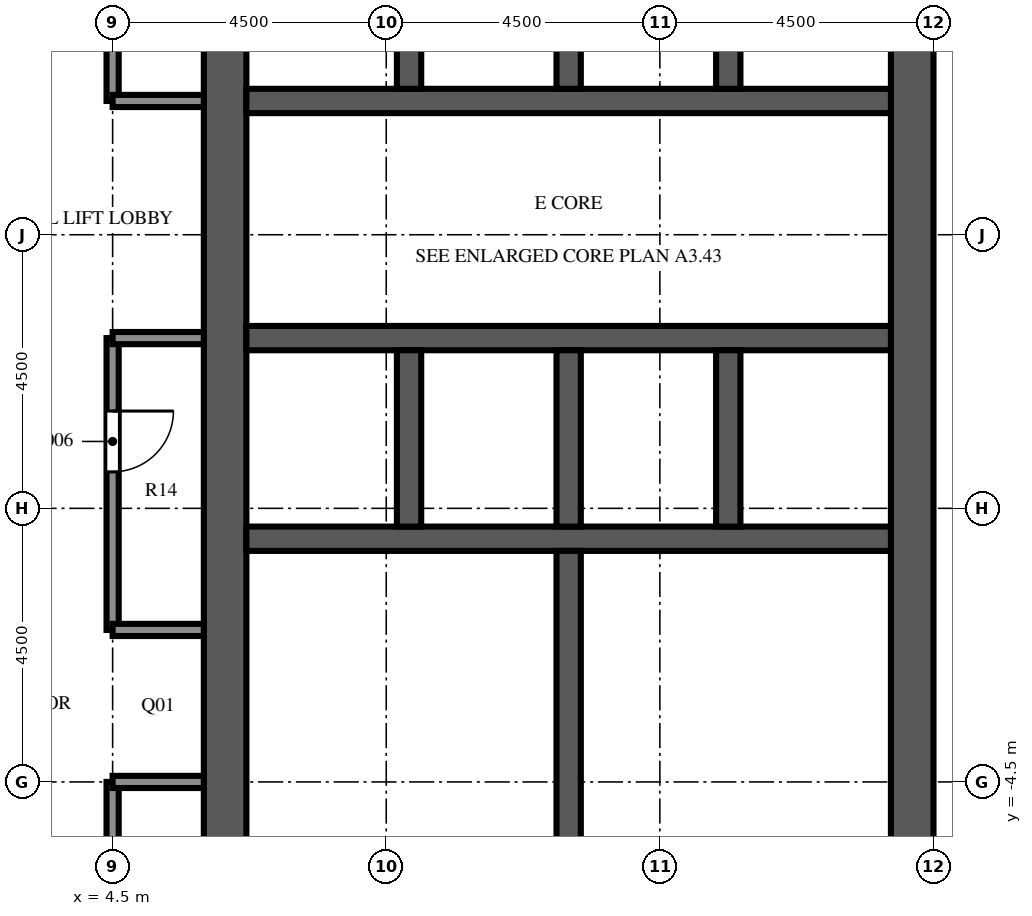
"""IFC4 building model, lengths in metres.
Left out: names, types, materials, properties, quantities, classifications, styles, units other than length and angle.
Written with IfcOpenShell. Run it as: python <this file> out.ifc"""

import sys

from ifc_helpers import new_model, si_unit, direction, frame, frame_2d, origin, place, context, subcontext, project, spatial, rectangle, extrude, element, fill, save


model = new_model("IFC4")
c1 = context("Model", 3, precision=1e-05, world=origin(), true_north=direction((0.0, 1.0)))
c2 = subcontext(c1, "Body", "Model", "MODEL_VIEW")
j1 = project(units=[si_unit("LENGTHUNIT", "METRE"), si_unit("PLANEANGLEUNIT", "RADIAN")], contexts=[c1])
p1 = place(None, origin())
s1 = spatial("IfcSite", under=j1, at=p1, CompositionType="ELEMENT")
p2 = place(p1, origin())
s2 = spatial("IfcBuilding", under=s1, at=p2, CompositionType="ELEMENT")
p3 = place(p2, frame((0.0, 0.0, 295.0)))
s3 = spatial("IfcBuildingStorey", under=s2, at=p3, CompositionType="ELEMENT", Elevation=295.0)
p4 = place(p3, frame((6.35, -9.0, 0.0), z_axis=(0.0, 0.0, 1.0), x_axis=(0.0, 1.0, 0.0)))
e1 = element("IfcWall", 1, at=p4, inside=s3, PredefinedType="SHEAR", context=c2, shape_type="SweptSolid", body=[
    extrude(rectangle(XDim=27.5, YDim=0.7, at=frame_2d((13.75, 0.0))), origin(), (0.0, 0.0, 1.0), 6.0),
])
p5 = place(p4, frame((12.55, 0.0, 0.0)))
e2 = element("IfcOpeningElement", 2, at=p5, cuts=e1, PredefinedType="OPENING", context=c2, shape_type="SweptSolid", body=[
    extrude(rectangle(XDim=2.4, YDim=2.4, at=frame_2d((1.2, 1.2))), frame((0.0, 0.36, 0.0), z_axis=(0.0, -1.0, 0.0), x_axis=(1.0, 0.0, 0.0)), (0.0, 0.0, 1.0), 0.72),
])
p6 = place(p4, frame((5.46, 0.0, 0.0)))
e3 = element("IfcOpeningElement", 3, at=p6, cuts=e1, PredefinedType="OPENING", context=c2, shape_type="SweptSolid", body=[
    extrude(rectangle(XDim=0.968, YDim=2.1, at=frame_2d((0.484, 1.05))), frame((0.0, 0.36, 0.0), z_axis=(0.0, -1.0, 0.0), x_axis=(1.0, 0.0, 0.0)), (0.0, 0.0, 1.0), 0.72),
])
p7 = place(p4, frame((23.54, 0.0, 0.0)))
e4 = element("IfcOpeningElement", 4, at=p7, cuts=e1, PredefinedType="OPENING", context=c2, shape_type="SweptSolid", body=[
    extrude(rectangle(XDim=1.2, YDim=2.1, at=frame_2d((0.6, 1.05))), frame((0.0, 0.36, 0.0), z_axis=(0.0, -1.0, 0.0), x_axis=(1.0, 0.0, 0.0)), (0.0, 0.0, 1.0), 0.72),
])
p8 = place(p3, frame((17.65, -9.0, 0.0), z_axis=(0.0, 0.0, 1.0), x_axis=(0.0, 1.0, 0.0)))
e5 = element("IfcWall", 5, at=p8, inside=s3, PredefinedType="SHEAR", context=c2, shape_type="SweptSolid", body=[
    extrude(rectangle(XDim=27.5, YDim=0.7, at=frame_2d((13.75, 0.0))), origin(), (0.0, 0.0, 1.0), 6.0),
])
p9 = place(p8, frame((12.55, 0.0, 0.0)))
e6 = element("IfcOpeningElement", 6, at=p9, cuts=e5, PredefinedType="OPENING", context=c2, shape_type="SweptSolid", body=[
    extrude(rectangle(XDim=2.4, YDim=2.4, at=frame_2d((1.2, 1.2))), frame((0.0, 0.36, 0.0), z_axis=(0.0, -1.0, 0.0), x_axis=(1.0, 0.0, 0.0)), (0.0, 0.0, 1.0), 0.72),
])
p10 = place(p8, frame((6.825, 0.0, 0.0)))
e7 = element("IfcOpeningElement", 7, at=p10, cuts=e5, PredefinedType="OPENING", context=c2, shape_type="SweptSolid", body=[
    extrude(rectangle(XDim=1.2, YDim=2.1, at=frame_2d((0.6, 1.05))), frame((0.0, 0.36, 0.0), z_axis=(0.0, -1.0, 0.0), x_axis=(1.0, 0.0, 0.0)), (0.0, 0.0, 1.0), 0.72),
])
p11 = place(p8, frame((19.475, 0.0, 0.0)))
e8 = element("IfcOpeningElement", 8, at=p11, cuts=e5, PredefinedType="OPENING", context=c2, shape_type="SweptSolid", body=[
    extrude(rectangle(XDim=1.2, YDim=2.1, at=frame_2d((0.6, 1.05))), frame((0.0, 0.36, 0.0), z_axis=(0.0, -1.0, 0.0), x_axis=(1.0, 0.0, 0.0)), (0.0, 0.0, 1.0), 0.72),
])
p12 = place(p3, frame((6.7, -0.5, 0.0), z_axis=(0.0, 0.0, 1.0), x_axis=(1.0, 0.0, 0.0)))
e9 = element("IfcWall", 9, at=p12, inside=s3, PredefinedType="SHEAR", context=c2, shape_type="SweptSolid", body=[
    extrude(rectangle(XDim=10.6, YDim=0.4, at=frame_2d((5.3, 0.0))), origin(), (0.0, 0.0, 1.0), 6.0),
])
p13 = place(p3, frame((6.7, 2.8, 0.0), z_axis=(0.0, 0.0, 1.0), x_axis=(1.0, 0.0, 0.0)))
e10 = element("IfcWall", 10, at=p13, inside=s3, PredefinedType="SHEAR", context=c2, shape_type="SweptSolid", body=[
    extrude(rectangle(XDim=10.6, YDim=0.4, at=frame_2d((5.3, 0.0))), origin(), (0.0, 0.0, 1.0), 6.0),
])
p14 = place(p13, frame((0.688, 0.0, 0.0)))
e11 = element("IfcOpeningElement", 11, at=p14, cuts=e10, PredefinedType="OPENING", context=c2, shape_type="SweptSolid", body=[
    extrude(rectangle(XDim=1.1, YDim=2.1, at=frame_2d((0.55, 1.05))), frame((0.0, 0.21, 0.0), z_axis=(0.0, -1.0, 0.0), x_axis=(1.0, 0.0, 0.0)), (0.0, 0.0, 1.0), 0.42),
])
p15 = place(p13, frame((3.438, 0.0, 0.0)))
e12 = element("IfcOpeningElement", 12, at=p15, cuts=e10, PredefinedType="OPENING", context=c2, shape_type="SweptSolid", body=[
    extrude(rectangle(XDim=1.1, YDim=2.1, at=frame_2d((0.55, 1.05))), frame((0.0, 0.21, 0.0), z_axis=(0.0, -1.0, 0.0), x_axis=(1.0, 0.0, 0.0)), (0.0, 0.0, 1.0), 0.42),
])
p16 = place(p13, frame((6.113, 0.0, 0.0)))
e13 = element("IfcOpeningElement", 13, at=p16, cuts=e10, PredefinedType="OPENING", context=c2, shape_type="SweptSolid", body=[
    extrude(rectangle(XDim=1.0, YDim=2.1, at=frame_2d((0.5, 1.05))), frame((0.0, 0.21, 0.0), z_axis=(0.0, -1.0, 0.0), x_axis=(1.0, 0.0, 0.0)), (0.0, 0.0, 1.0), 0.42),
])
p17 = place(p13, frame((8.863, 0.0, 0.0)))
e14 = element("IfcOpeningElement", 14, at=p17, cuts=e10, PredefinedType="OPENING", context=c2, shape_type="SweptSolid", body=[
    extrude(rectangle(XDim=1.0, YDim=2.1, at=frame_2d((0.5, 1.05))), frame((0.0, 0.21, 0.0), z_axis=(0.0, -1.0, 0.0), x_axis=(1.0, 0.0, 0.0)), (0.0, 0.0, 1.0), 0.42),
])
p18 = place(p3, frame((6.7, 6.7, 0.0), z_axis=(0.0, 0.0, 1.0), x_axis=(1.0, 0.0, 0.0)))
e15 = element("IfcWall", 15, at=p18, inside=s3, PredefinedType="SHEAR", context=c2, shape_type="SweptSolid", body=[
    extrude(rectangle(XDim=10.6, YDim=0.4, at=frame_2d((5.3, 0.0))), origin(), (0.0, 0.0, 1.0), 6.0),
])
p19 = place(p18, frame((3.438, 0.0, 0.0)))
e16 = element("IfcOpeningElement", 16, at=p19, cuts=e15, PredefinedType="OPENING", context=c2, shape_type="SweptSolid", body=[
    extrude(rectangle(XDim=1.1, YDim=2.1, at=frame_2d((0.55, 1.05))), frame((0.0, 0.21, 0.0), z_axis=(0.0, -1.0, 0.0), x_axis=(1.0, 0.0, 0.0)), (0.0, 0.0, 1.0), 0.42),
])
p20 = place(p18, frame((6.062, 0.0, 0.0)))
e17 = element("IfcOpeningElement", 17, at=p20, cuts=e15, PredefinedType="OPENING", context=c2, shape_type="SweptSolid", body=[
    extrude(rectangle(XDim=1.1, YDim=2.1, at=frame_2d((0.55, 1.05))), frame((0.0, 0.21, 0.0), z_axis=(0.0, -1.0, 0.0), x_axis=(1.0, 0.0, 0.0)), (0.0, 0.0, 1.0), 0.42),
])
p21 = place(p18, frame((8.812, 0.0, 0.0)))
e18 = element("IfcOpeningElement", 18, at=p21, cuts=e15, PredefinedType="OPENING", context=c2, shape_type="SweptSolid", body=[
    extrude(rectangle(XDim=1.1, YDim=2.1, at=frame_2d((0.55, 1.05))), frame((0.0, 0.21, 0.0), z_axis=(0.0, -1.0, 0.0), x_axis=(1.0, 0.0, 0.0)), (0.0, 0.0, 1.0), 0.42),
])
p22 = place(p18, frame((0.738, 0.0, 0.0)))
e19 = element("IfcOpeningElement", 19, at=p22, cuts=e15, PredefinedType="OPENING", context=c2, shape_type="SweptSolid", body=[
    extrude(rectangle(XDim=1.0, YDim=2.1, at=frame_2d((0.5, 1.05))), frame((0.0, 0.21, 0.0), z_axis=(0.0, -1.0, 0.0), x_axis=(1.0, 0.0, 0.0)), (0.0, 0.0, 1.0), 0.42),
])
for number, where, z_axis, x_axis in (
    (20, (9.375, -0.3, 0.0), (0.0, 0.0, 1.0), (0.0, 1.0, 0.0)),
    (21, (9.375, 6.9, 0.0), (0.0, 0.0, 1.0), (0.0, 1.0, 0.0)),
    (22, (12.0, -0.3, 0.0), (0.0, 0.0, 1.0), (0.0, 1.0, 0.0)),
    (23, (12.0, 6.9, 0.0), (0.0, 0.0, 1.0), (0.0, 1.0, 0.0)),
    (24, (14.625, -0.3, 0.0), (0.0, 0.0, 1.0), (0.0, 1.0, 0.0)),
    (25, (14.625, 6.9, 0.0), (0.0, 0.0, 1.0), (0.0, 1.0, 0.0)),
):
    element("IfcWall", number, at=place(p3, frame(where, z_axis=z_axis, x_axis=x_axis)), inside=s3, PredefinedType="SHEAR", context=c2, shape_type="SweptSolid", body=[
        extrude(rectangle(XDim=2.9, YDim=0.4, at=frame_2d((1.45, 0.0))), origin(), (0.0, 0.0, 1.0), 6.0),
    ])
p23 = place(p3, frame((12.0, -8.3, 0.0), z_axis=(0.0, 0.0, 1.0), x_axis=(0.0, 1.0, 0.0)))
e26 = element("IfcWall", 26, at=p23, inside=s3, PredefinedType="SHEAR", context=c2, shape_type="SweptSolid", body=[
    extrude(rectangle(XDim=7.6, YDim=0.4, at=frame_2d((3.8, 0.0))), origin(), (0.0, 0.0, 1.0), 6.0),
])
p24 = place(p3, frame((6.7, -3.74, 0.0), z_axis=(0.0, 0.0, 1.0), x_axis=(1.0, 0.0, 0.0)))
e27 = element("IfcWall", 27, at=p24, inside=s3, PredefinedType="PARTITIONING", context=c2, shape_type="SweptSolid", body=[
    extrude(rectangle(XDim=2.55, YDim=0.1, at=frame_2d((1.275, 0.0))), origin(), (0.0, 0.0, 1.0), 5.4),
])
p25 = place(p24, frame((0.775, 0.0, 0.0)))
e28 = element("IfcOpeningElement", 28, at=p25, cuts=e27, PredefinedType="OPENING", context=c2, shape_type="SweptSolid", body=[
    extrude(rectangle(XDim=1.0, YDim=2.1, at=frame_2d((0.5, 1.05))), frame((0.0, 0.06, 0.0), z_axis=(0.0, -1.0, 0.0), x_axis=(1.0, 0.0, 0.0)), (0.0, 0.0, 1.0), 0.12),
])
p26 = place(p3, frame((9.25, -3.74, 0.0), z_axis=(0.0, 0.0, 1.0), x_axis=(1.0, 0.0, 0.0)))
e29 = element("IfcWall", 29, at=p26, inside=s3, PredefinedType="PARTITIONING", context=c2, shape_type="SweptSolid", body=[
    extrude(rectangle(XDim=2.55, YDim=0.1, at=frame_2d((1.275, 0.0))), origin(), (0.0, 0.0, 1.0), 5.4),
])
p27 = place(p26, frame((0.775, 0.0, 0.0)))
e30 = element("IfcOpeningElement", 30, at=p27, cuts=e29, PredefinedType="OPENING", context=c2, shape_type="SweptSolid", body=[
    extrude(rectangle(XDim=1.0, YDim=2.1, at=frame_2d((0.5, 1.05))), frame((0.0, 0.06, 0.0), z_axis=(0.0, -1.0, 0.0), x_axis=(1.0, 0.0, 0.0)), (0.0, 0.0, 1.0), 0.12),
])
p28 = place(p3, frame((6.7, -2.372, 0.0), z_axis=(0.0, 0.0, 1.0), x_axis=(1.0, 0.0, 0.0)))
e31 = element("IfcWall", 31, at=p28, inside=s3, PredefinedType="PARTITIONING", context=c2, shape_type="SweptSolid", body=[
    extrude(rectangle(XDim=2.55, YDim=0.1, at=frame_2d((1.275, 0.0))), origin(), (0.0, 0.0, 1.0), 5.4),
])
p29 = place(p28, frame((0.775, 0.0, 0.0)))
e32 = element("IfcOpeningElement", 32, at=p29, cuts=e31, PredefinedType="OPENING", context=c2, shape_type="SweptSolid", body=[
    extrude(rectangle(XDim=1.0, YDim=2.1, at=frame_2d((0.5, 1.05))), frame((0.0, 0.06, 0.0), z_axis=(0.0, -1.0, 0.0), x_axis=(1.0, 0.0, 0.0)), (0.0, 0.0, 1.0), 0.12),
])
p30 = place(p3, frame((9.25, -2.372, 0.0), z_axis=(0.0, 0.0, 1.0), x_axis=(1.0, 0.0, 0.0)))
e33 = element("IfcWall", 33, at=p30, inside=s3, PredefinedType="PARTITIONING", context=c2, shape_type="SweptSolid", body=[
    extrude(rectangle(XDim=2.55, YDim=0.1, at=frame_2d((1.275, 0.0))), origin(), (0.0, 0.0, 1.0), 5.4),
])
p31 = place(p30, frame((0.775, 0.0, 0.0)))
e34 = element("IfcOpeningElement", 34, at=p31, cuts=e33, PredefinedType="OPENING", context=c2, shape_type="SweptSolid", body=[
    extrude(rectangle(XDim=1.0, YDim=2.1, at=frame_2d((0.5, 1.05))), frame((0.0, 0.06, 0.0), z_axis=(0.0, -1.0, 0.0), x_axis=(1.0, 0.0, 0.0)), (0.0, 0.0, 1.0), 0.12),
])
p32 = place(p3, frame((9.25, -8.3, 0.0), z_axis=(0.0, 0.0, 1.0), x_axis=(0.0, 1.0, 0.0)))
e35 = element("IfcWall", 35, at=p32, inside=s3, PredefinedType="PARTITIONING", context=c2, shape_type="SweptSolid", body=[
    extrude(rectangle(XDim=4.56, YDim=0.1, at=frame_2d((2.28, 0.0))), origin(), (0.0, 0.0, 1.0), 5.4),
])
p33 = place(p3, frame((9.25, -2.372, 0.0), z_axis=(0.0, 0.0, 1.0), x_axis=(0.0, 1.0, 0.0)))
e36 = element("IfcWall", 36, at=p33, inside=s3, PredefinedType="PARTITIONING", context=c2, shape_type="SweptSolid", body=[
    extrude(rectangle(XDim=1.672, YDim=0.1, at=frame_2d((0.836, 0.0))), origin(), (0.0, 0.0, 1.0), 5.4),
])
p34 = place(p3, frame((4.5, -4.5, 0.0), z_axis=(0.0, 0.0, 1.0), x_axis=(0.0, -1.0, 0.0)))
e37 = element("IfcWall", 37, at=p34, inside=s3, PredefinedType="PARTITIONING", context=c2, shape_type="SweptSolid", body=[
    extrude(rectangle(XDim=4.5, YDim=0.2, at=frame_2d((2.25, 0.0))), origin(), (0.0, 0.0, 1.0), 5.4),
])
p35 = place(p34, frame((1.65, 0.0, 0.0)))
e38 = element("IfcOpeningElement", 38, at=p35, cuts=e37, PredefinedType="OPENING", context=c2, shape_type="SweptSolid", body=[
    extrude(rectangle(XDim=1.0, YDim=2.1, at=frame_2d((0.5, 1.05))), frame((0.0, 0.11, 0.0), z_axis=(0.0, -1.0, 0.0), x_axis=(1.0, 0.0, 0.0)), (0.0, 0.0, 1.0), 0.22),
])
p36 = place(p3, frame((4.5, 2.8, 0.0), z_axis=(0.0, 0.0, 1.0), x_axis=(0.0, -1.0, 0.0)))
e39 = element("IfcWall", 39, at=p36, inside=s3, PredefinedType="PARTITIONING", context=c2, shape_type="SweptSolid", body=[
    extrude(rectangle(XDim=4.8, YDim=0.2, at=frame_2d((2.4, 0.0))), origin(), (0.0, 0.0, 1.0), 5.4),
])
p37 = place(p36, frame((1.2, 0.0, 0.0)))
e40 = element("IfcOpeningElement", 40, at=p37, cuts=e39, PredefinedType="OPENING", context=c2, shape_type="SweptSolid", body=[
    extrude(rectangle(XDim=1.0, YDim=2.1, at=frame_2d((0.5, 1.05))), frame((0.0, 0.11, 0.0), z_axis=(0.0, -1.0, 0.0), x_axis=(1.0, 0.0, 0.0)), (0.0, 0.0, 1.0), 0.22),
])
p38 = place(p3, frame((4.5, 18.5, 0.0), z_axis=(0.0, 0.0, 1.0), x_axis=(0.0, -1.0, 0.0)))
e41 = element("IfcWall", 41, at=p38, inside=s3, PredefinedType="PARTITIONING", context=c2, shape_type="SweptSolid", body=[
    extrude(rectangle(XDim=11.8, YDim=0.2, at=frame_2d((5.9, 0.0))), origin(), (0.0, 0.0, 1.0), 5.4),
])
p39 = place(p38, frame((4.7, 0.0, 0.0)))
e42 = element("IfcOpeningElement", 42, at=p39, cuts=e41, PredefinedType="OPENING", context=c2, shape_type="SweptSolid", body=[
    extrude(rectangle(XDim=1.0, YDim=2.1, at=frame_2d((0.5, 1.05))), frame((0.0, 0.11, 0.0), z_axis=(0.0, -1.0, 0.0), x_axis=(1.0, 0.0, 0.0)), (0.0, 0.0, 1.0), 0.22),
])
for number, where, z_axis, x_axis in (
    (43, (4.5, -4.5, 0.0), (0.0, 0.0, 1.0), (1.0, 0.0, 0.0)),
    (44, (4.5, -2.0, 0.0), (0.0, 0.0, 1.0), (1.0, 0.0, 0.0)),
    (45, (4.5, 2.8, 0.0), (0.0, 0.0, 1.0), (1.0, 0.0, 0.0)),
    (46, (4.5, 6.7, 0.0), (0.0, 0.0, 1.0), (1.0, 0.0, 0.0)),
):
    element("IfcWall", number, at=place(p3, frame(where, z_axis=z_axis, x_axis=x_axis)), inside=s3, PredefinedType="PARTITIONING", context=c2, shape_type="SweptSolid", body=[
        extrude(rectangle(XDim=1.5, YDim=0.2, at=frame_2d((0.75, 0.0))), origin(), (0.0, 0.0, 1.0), 5.4),
    ])
p40 = place(p14, origin())
e47 = element("IfcDoor", 47, at=p40, inside=s3, OperationType="DOUBLE_DOOR_SLIDING", PredefinedType="DOOR", context=c2, shape_type="SweptSolid", body=[
    extrude(rectangle(XDim=1.1, YDim=2.1, at=frame_2d((0.55, 1.05))), frame((0.0, 0.025, 0.0), z_axis=(0.0, -1.0, 0.0), x_axis=(1.0, 0.0, 0.0)), (0.0, 0.0, 1.0), 0.05),
])
fill(e11, e47)
p41 = place(p15, origin())
e48 = element("IfcDoor", 48, at=p41, inside=s3, OperationType="DOUBLE_DOOR_SLIDING", PredefinedType="DOOR", context=c2, shape_type="SweptSolid", body=[
    extrude(rectangle(XDim=1.1, YDim=2.1, at=frame_2d((0.55, 1.05))), frame((0.0, 0.025, 0.0), z_axis=(0.0, -1.0, 0.0), x_axis=(1.0, 0.0, 0.0)), (0.0, 0.0, 1.0), 0.05),
])
fill(e12, e48)
p42 = place(p19, origin())
e49 = element("IfcDoor", 49, at=p42, inside=s3, OperationType="DOUBLE_DOOR_SLIDING", PredefinedType="DOOR", context=c2, shape_type="SweptSolid", body=[
    extrude(rectangle(XDim=1.1, YDim=2.1, at=frame_2d((0.55, 1.05))), frame((0.0, 0.025, 0.0), z_axis=(0.0, -1.0, 0.0), x_axis=(1.0, 0.0, 0.0)), (0.0, 0.0, 1.0), 0.05),
])
fill(e16, e49)
p43 = place(p20, origin())
e50 = element("IfcDoor", 50, at=p43, inside=s3, OperationType="DOUBLE_DOOR_SLIDING", PredefinedType="DOOR", context=c2, shape_type="SweptSolid", body=[
    extrude(rectangle(XDim=1.1, YDim=2.1, at=frame_2d((0.55, 1.05))), frame((0.0, 0.025, 0.0), z_axis=(0.0, -1.0, 0.0), x_axis=(1.0, 0.0, 0.0)), (0.0, 0.0, 1.0), 0.05),
])
fill(e17, e50)
p44 = place(p21, origin())
e51 = element("IfcDoor", 51, at=p44, inside=s3, OperationType="DOUBLE_DOOR_SLIDING", PredefinedType="DOOR", context=c2, shape_type="SweptSolid", body=[
    extrude(rectangle(XDim=1.1, YDim=2.1, at=frame_2d((0.55, 1.05))), frame((0.0, 0.025, 0.0), z_axis=(0.0, -1.0, 0.0), x_axis=(1.0, 0.0, 0.0)), (0.0, 0.0, 1.0), 0.05),
])
fill(e18, e51)
p45 = place(p5, origin())
e52 = element("IfcDoor", 52, at=p45, inside=s3, OperationType="DOUBLE_DOOR_DOUBLE_SWING", PredefinedType="DOOR", context=c2, shape_type="SweptSolid", body=[
    extrude(rectangle(XDim=2.4, YDim=2.4, at=frame_2d((1.2, 1.2))), frame((0.0, 0.025, 0.0), z_axis=(0.0, -1.0, 0.0), x_axis=(1.0, 0.0, 0.0)), (0.0, 0.0, 1.0), 0.05),
])
fill(e2, e52)
p46 = place(p9, origin())
e53 = element("IfcDoor", 53, at=p46, inside=s3, OperationType="DOUBLE_DOOR_DOUBLE_SWING", PredefinedType="DOOR", context=c2, shape_type="SweptSolid", body=[
    extrude(rectangle(XDim=2.4, YDim=2.4, at=frame_2d((1.2, 1.2))), frame((0.0, 0.025, 0.0), z_axis=(0.0, -1.0, 0.0), x_axis=(1.0, 0.0, 0.0)), (0.0, 0.0, 1.0), 0.05),
])
fill(e6, e53)
p47 = place(p10, frame((1.2, 0.0, 0.0), z_axis=(0.0, 0.0, 1.0), x_axis=(-1.0, 0.0, 0.0)))
e54 = element("IfcDoor", 54, at=p47, inside=s3, OperationType="SINGLE_SWING_LEFT", PredefinedType="DOOR", context=c2, shape_type="SweptSolid", body=[
    extrude(rectangle(XDim=1.2, YDim=2.1, at=frame_2d((0.6, 1.05))), frame((0.0, 0.025, 0.0), z_axis=(0.0, -1.0, 0.0), x_axis=(1.0, 0.0, 0.0)), (0.0, 0.0, 1.0), 0.05),
])
fill(e7, e54)
p48 = place(p16, origin())
e55 = element("IfcDoor", 55, at=p48, inside=s3, OperationType="SINGLE_SWING_LEFT", PredefinedType="DOOR", context=c2, shape_type="SweptSolid", body=[
    extrude(rectangle(XDim=1.0, YDim=2.1, at=frame_2d((0.5, 1.05))), frame((0.0, 0.025, 0.0), z_axis=(0.0, -1.0, 0.0), x_axis=(1.0, 0.0, 0.0)), (0.0, 0.0, 1.0), 0.05),
])
fill(e13, e55)
p49 = place(p17, origin())
e56 = element("IfcDoor", 56, at=p49, inside=s3, OperationType="SINGLE_SWING_RIGHT", PredefinedType="DOOR", context=c2, shape_type="SweptSolid", body=[
    extrude(rectangle(XDim=1.0, YDim=2.1, at=frame_2d((0.5, 1.05))), frame((0.0, 0.025, 0.0), z_axis=(0.0, -1.0, 0.0), x_axis=(1.0, 0.0, 0.0)), (0.0, 0.0, 1.0), 0.05),
])
fill(e14, e56)
p50 = place(p22, origin())
e57 = element("IfcDoor", 57, at=p50, inside=s3, OperationType="SINGLE_SWING_LEFT", PredefinedType="DOOR", context=c2, shape_type="SweptSolid", body=[
    extrude(rectangle(XDim=1.0, YDim=2.1, at=frame_2d((0.5, 1.05))), frame((0.0, 0.025, 0.0), z_axis=(0.0, -1.0, 0.0), x_axis=(1.0, 0.0, 0.0)), (0.0, 0.0, 1.0), 0.05),
])
fill(e19, e57)
p51 = place(p6, origin())
e58 = element("IfcDoor", 58, at=p51, inside=s3, OperationType="SINGLE_SWING_RIGHT", PredefinedType="DOOR", context=c2, shape_type="SweptSolid", body=[
    extrude(rectangle(XDim=0.968, YDim=2.1, at=frame_2d((0.484, 1.05))), frame((0.0, -0.275, 0.0), z_axis=(0.0, -1.0, 0.0), x_axis=(1.0, 0.0, 0.0)), (0.0, 0.0, 1.0), 0.05),
])
fill(e3, e58)
p52 = place(p25, origin())
e59 = element("IfcDoor", 59, at=p52, inside=s3, OperationType="SINGLE_SWING_LEFT", PredefinedType="DOOR", context=c2, shape_type="SweptSolid", body=[
    extrude(rectangle(XDim=1.0, YDim=2.1, at=frame_2d((0.5, 1.05))), frame((0.0, 0.025, 0.0), z_axis=(0.0, -1.0, 0.0), x_axis=(1.0, 0.0, 0.0)), (0.0, 0.0, 1.0), 0.05),
])
fill(e28, e59)
p53 = place(p27, origin())
e60 = element("IfcDoor", 60, at=p53, inside=s3, OperationType="SINGLE_SWING_RIGHT", PredefinedType="DOOR", context=c2, shape_type="SweptSolid", body=[
    extrude(rectangle(XDim=1.0, YDim=2.1, at=frame_2d((0.5, 1.05))), frame((0.0, 0.025, 0.0), z_axis=(0.0, -1.0, 0.0), x_axis=(1.0, 0.0, 0.0)), (0.0, 0.0, 1.0), 0.05),
])
fill(e30, e60)
p54 = place(p29, origin())
e61 = element("IfcDoor", 61, at=p54, inside=s3, OperationType="SINGLE_SWING_LEFT", PredefinedType="DOOR", context=c2, shape_type="SweptSolid", body=[
    extrude(rectangle(XDim=1.0, YDim=2.1, at=frame_2d((0.5, 1.05))), frame((0.0, 0.025, 0.0), z_axis=(0.0, -1.0, 0.0), x_axis=(1.0, 0.0, 0.0)), (0.0, 0.0, 1.0), 0.05),
])
fill(e32, e61)
p55 = place(p31, origin())
e62 = element("IfcDoor", 62, at=p55, inside=s3, OperationType="SINGLE_SWING_RIGHT", PredefinedType="DOOR", context=c2, shape_type="SweptSolid", body=[
    extrude(rectangle(XDim=1.0, YDim=2.1, at=frame_2d((0.5, 1.05))), frame((0.0, 0.025, 0.0), z_axis=(0.0, -1.0, 0.0), x_axis=(1.0, 0.0, 0.0)), (0.0, 0.0, 1.0), 0.05),
])
fill(e34, e62)
p56 = place(p37, origin())
e63 = element("IfcDoor", 63, at=p56, inside=s3, OperationType="SINGLE_SWING_LEFT", PredefinedType="DOOR", context=c2, shape_type="SweptSolid", body=[
    extrude(rectangle(XDim=1.0, YDim=2.1, at=frame_2d((0.5, 1.05))), frame((0.0, 0.025, 0.0), z_axis=(0.0, -1.0, 0.0), x_axis=(1.0, 0.0, 0.0)), (0.0, 0.0, 1.0), 0.05),
])
fill(e40, e63)
save(model, sys.argv[1])
